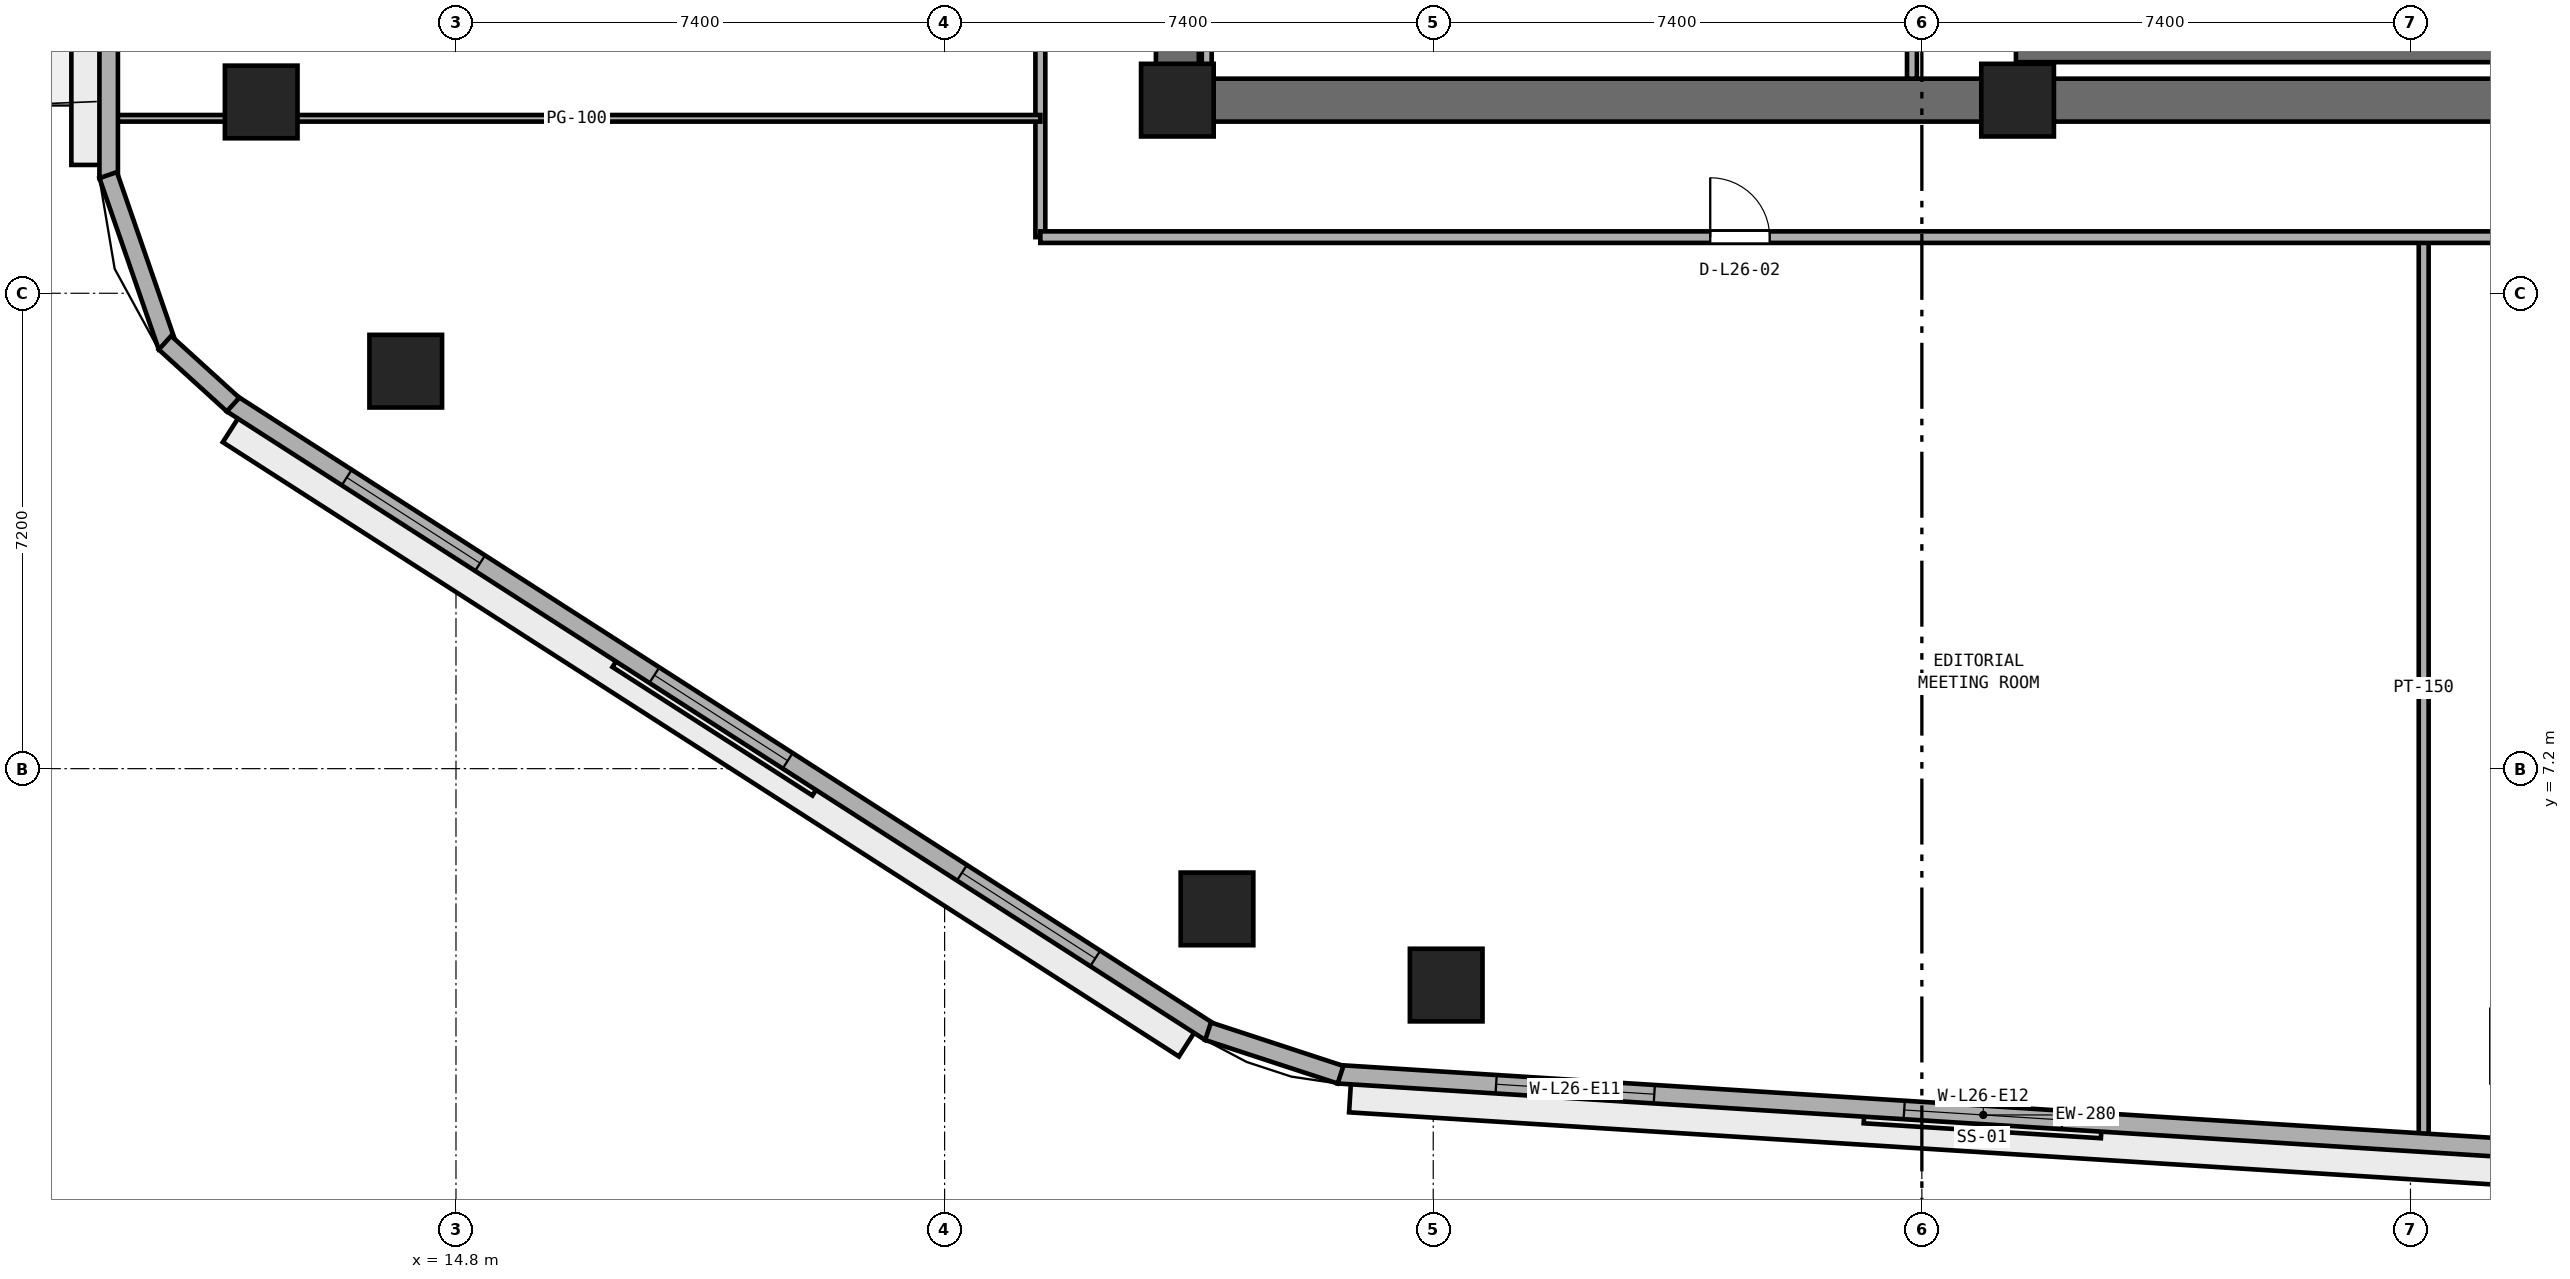
"""IFC4 building model, lengths in metres.
Left out: names, types, materials, properties, quantities, classifications, styles, units other than length and angle.
Written with IfcOpenShell. Run it as: python <this file> out.ifc"""

import sys

from ifc_helpers import new_model, si_unit, direction, frame, frame_2d, origin, origin_2d, place, context, subcontext, project, spatial, rectangle, extrude, element, fill, save


model = new_model("IFC4")
c1 = context("Model", 3, precision=1e-05, world=origin(), true_north=direction((0.0, 1.0)))
c2 = subcontext(c1, "Body", "Model", "MODEL_VIEW")
j1 = project(units=[si_unit("LENGTHUNIT", "METRE"), si_unit("PLANEANGLEUNIT", "RADIAN")], contexts=[c1])
p1 = place(None, origin())
s1 = spatial("IfcSite", under=j1, at=p1, CompositionType="ELEMENT")
p2 = place(p1, origin())
s2 = spatial("IfcBuilding", under=s1, at=p2, CompositionType="ELEMENT")
p3 = place(p2, frame((0.0, 0.0, 104.8)))
s3 = spatial("IfcBuildingStorey", under=s2, at=p3, CompositionType="ELEMENT", Elevation=104.8)
p4 = place(p3, frame((25.4, 17.325, 0.0), z_axis=(0.0, 0.0, 1.0), x_axis=(1.0, 0.0, 0.0)))
e1 = element("IfcWall", 1, at=p4, inside=s3, PredefinedType="SHEAR", context=c2, shape_type="SweptSolid", body=[
    extrude(rectangle(XDim=23.2, YDim=0.65, at=frame_2d((11.6, 0.0))), origin(), (0.0, 0.0, 1.0), 3.525),
])
p5 = place(p3, frame((25.725, 17.65, 0.0), z_axis=(0.0, 0.0, 1.0), x_axis=(0.0, 1.0, 0.0)))
e2 = element("IfcWall", 2, at=p5, inside=s3, PredefinedType="SHEAR", context=c2, shape_type="SweptSolid", body=[
    extrude(rectangle(XDim=15.1, YDim=0.65, at=frame_2d((7.55, 0.0))), origin(), (0.0, 0.0, 1.0), 3.525),
])
p6 = place(p5, frame((6.8, 0.0, 0.0)))
e3 = element("IfcOpeningElement", 3, at=p6, cuts=e2, PredefinedType="OPENING", context=c2, shape_type="SweptSolid", body=[
    extrude(rectangle(XDim=1.5, YDim=2.15, at=frame_2d((0.75, 1.075))), frame((0.0, 0.335, 0.0), z_axis=(0.0, -1.0, 0.0), x_axis=(1.0, 0.0, 0.0)), (0.0, 0.0, 1.0), 0.67),
])
for number, where, z_axis, x_axis in (
    (4, (25.725, 17.325, 0.0), (0.0, 0.0, 1.0), (1.0, 0.0, 0.0)),
    (5, (38.45, 17.325, 0.0), (0.0, 0.0, 1.0), (1.0, 0.0, 0.0)),
):
    element("IfcColumn", number, at=place(p3, frame(where, z_axis=z_axis, x_axis=x_axis)), inside=s3, PredefinedType="PILASTER", context=c2, shape_type="SweptSolid", body=[
        extrude(rectangle(XDim=1.1, YDim=1.1, at=origin_2d()), origin(), (0.0, 0.0, 1.0), 3.8),
    ])
for number, where, z_axis, x_axis in (
    (6, (29.796, 3.922, 0.0), (0.0, 0.0, 1.0), (1.0, 0.0, 0.0)),
    (7, (11.85, 17.298, 0.0), (0.0, 0.0, 1.0), (1.0, 0.0, 0.0)),
    (8, (14.039, 13.22, 0.0), (0.0, 0.0, 1.0), (1.0, 0.0, 0.0)),
    (9, (26.325, 5.076, 0.0), (0.0, 0.0, 1.0), (1.0, 0.0, 0.0)),
):
    element("IfcColumn", number, at=place(p3, frame(where, z_axis=z_axis, x_axis=x_axis)), inside=s3, PredefinedType="COLUMN", context=c2, shape_type="SweptSolid", body=[
        extrude(rectangle(XDim=1.1, YDim=1.1, at=origin_2d()), origin(), (0.0, 0.0, 1.0), 3.8),
    ])
p7 = place(p3, frame((38.425, 18.025, 0.0), z_axis=(0.0, 0.0, 1.0), x_axis=(1.0, 0.0, 0.0)))
e10 = element("IfcWall", 10, at=p7, inside=s3, PredefinedType="SHEAR", context=c2, shape_type="SweptSolid", body=[
    extrude(rectangle(XDim=7.3, YDim=0.25, at=frame_2d((3.65, 0.0))), origin(), (0.0, 0.0, 1.0), 3.525),
])
for number, where, z_axis, x_axis in (
    (11, (26.17, 17.65, 0.0), (0.0, 0.0, 1.0), (0.0, 1.0, 0.0)),
    (12, (36.85, 17.65, 0.0), (0.0, 0.0, 1.0), (0.0, 1.0, 0.0)),
):
    element("IfcWall", number, at=place(p3, frame(where, z_axis=z_axis, x_axis=x_axis)), inside=s3, PredefinedType="PARTITIONING", context=c2, shape_type="SweptSolid", body=[
        extrude(rectangle(XDim=2.1, YDim=0.15, at=frame_2d((1.05, 0.0))), origin(), (0.0, 0.0, 1.0), 3.525),
    ])
p8 = place(p3, frame((44.6, 1.599, 0.0), z_axis=(0.0, 0.0, 1.0), x_axis=(0.0, 1.0, 0.0)))
e13 = element("IfcWall", 13, at=p8, inside=s3, PredefinedType="PARTITIONING", context=c2, shape_type="SweptSolid", body=[
    extrude(rectangle(XDim=13.651, YDim=0.15, at=frame_2d((6.825, 0.0))), origin(), (0.0, 0.0, 1.0), 3.525),
])
p9 = place(p3, frame((23.65, 15.25, 0.0), z_axis=(0.0, 0.0, 1.0), x_axis=(0.0, 1.0, 0.0)))
e14 = element("IfcWall", 14, at=p9, inside=s3, PredefinedType="PARTITIONING", context=c2, shape_type="SweptSolid", body=[
    extrude(rectangle(XDim=19.9, YDim=0.15, at=frame_2d((9.95, 0.0))), origin(), (0.0, 0.0, 1.0), 3.525),
])
p10 = place(p9, frame((9.5, 0.0, 0.0)))
e15 = element("IfcOpeningElement", 15, at=p10, cuts=e14, PredefinedType="OPENING", context=c2, shape_type="SweptSolid", body=[
    extrude(rectangle(XDim=0.9, YDim=2.1, at=frame_2d((0.45, 1.05))), frame((0.0, 0.085, 0.0), z_axis=(0.0, -1.0, 0.0), x_axis=(1.0, 0.0, 0.0)), (0.0, 0.0, 1.0), 0.17),
])
p11 = place(p3, frame((23.65, 15.25, 0.0), z_axis=(0.0, 0.0, 1.0), x_axis=(1.0, 0.0, 0.0)))
e16 = element("IfcWall", 16, at=p11, inside=s3, PredefinedType="PARTITIONING", context=c2, shape_type="SweptSolid", body=[
    extrude(rectangle(XDim=26.7, YDim=0.175, at=frame_2d((13.35, 0.0))), origin(), (0.0, 0.0, 1.0), 3.525),
])
p12 = place(p11, frame((10.145, 0.0, 0.0)))
e17 = element("IfcOpeningElement", 17, at=p12, cuts=e16, PredefinedType="OPENING", context=c2, shape_type="SweptSolid", body=[
    extrude(rectangle(XDim=0.9, YDim=2.1, at=frame_2d((0.45, 1.05))), frame((0.0, 0.097, 0.0), z_axis=(0.0, -1.0, 0.0), x_axis=(1.0, 0.0, 0.0)), (0.0, 0.0, 1.0), 0.195),
])
p13 = place(p11, frame((23.255, 0.0, 0.0)))
e18 = element("IfcOpeningElement", 18, at=p13, cuts=e16, PredefinedType="OPENING", context=c2, shape_type="SweptSolid", body=[
    extrude(rectangle(XDim=0.9, YDim=2.1, at=frame_2d((0.45, 1.05))), frame((0.0, 0.097, 0.0), z_axis=(0.0, -1.0, 0.0), x_axis=(1.0, 0.0, 0.0)), (0.0, 0.0, 1.0), 0.195),
])
p14 = place(p3, frame((9.605, 17.05, 0.0), z_axis=(0.0, 0.0, 1.0), x_axis=(1.0, 0.0, 0.0)))
e19 = element("IfcWall", 19, at=p14, inside=s3, PredefinedType="PARTITIONING", context=c2, shape_type="SweptSolid", body=[
    extrude(rectangle(XDim=14.045, YDim=0.1, at=frame_2d((7.022, 0.0))), origin(), (0.0, 0.0, 1.0), 3.525),
])
p15 = place(p3, frame((28.161, 2.571, 0.0), z_axis=(0.0, 0.0, 1.0), x_axis=(0.998017288298, -0.06294038654, 0.0)))
e20 = element("IfcWall", 20, at=p15, inside=s3, PredefinedType="STANDARD", context=c2, shape_type="SweptSolid", body=[
    extrude(rectangle(XDim=19.577, YDim=0.28, at=frame_2d((9.789, 0.0))), origin(), (0.0, 0.0, 1.0), 3.525),
])
p16 = place(p15, frame((2.396, 0.0, 0.9)))
e21 = element("IfcOpeningElement", 21, at=p16, cuts=e20, PredefinedType="OPENING", context=c2, shape_type="SweptSolid", body=[
    extrude(rectangle(XDim=2.4, YDim=1.75, at=frame_2d((1.2, 0.875))), frame((0.0, 0.15, 0.0), z_axis=(0.0, -1.0, 0.0), x_axis=(1.0, 0.0, 0.0)), (0.0, 0.0, 1.0), 0.3),
])
p17 = place(p15, frame((8.588, 0.0, 0.9)))
e22 = element("IfcOpeningElement", 22, at=p17, cuts=e20, PredefinedType="OPENING", context=c2, shape_type="SweptSolid", body=[
    extrude(rectangle(XDim=2.4, YDim=1.75, at=frame_2d((1.2, 0.875))), frame((0.0, 0.15, 0.0), z_axis=(0.0, -1.0, 0.0), x_axis=(1.0, 0.0, 0.0)), (0.0, 0.0, 1.0), 0.3),
])
p18 = place(p3, frame((9.54, 33.444, 0.0), z_axis=(0.0, 0.0, 1.0), x_axis=(0.0, -1.0, 0.0)))
e23 = element("IfcWall", 23, at=p18, inside=s3, PredefinedType="STANDARD", context=c2, shape_type="SweptSolid", body=[
    extrude(rectangle(XDim=17.301, YDim=0.28, at=frame_2d((8.65, 0.0))), origin(), (0.0, 0.0, 1.0), 3.525),
])
p19 = place(p18, frame((8.1, 0.0, 0.0)))
e24 = element("IfcOpeningElement", 24, at=p19, cuts=e23, PredefinedType="OPENING", context=c2, shape_type="SweptSolid", body=[
    extrude(rectangle(XDim=1.1, YDim=2.2, at=frame_2d((0.55, 1.1))), frame((0.0, 0.15, 0.0), z_axis=(0.0, -1.0, 0.0), x_axis=(1.0, 0.0, 0.0)), (0.0, 0.0, 1.0), 0.3),
])
p20 = place(p18, frame((2.017, 0.0, 0.9)))
e25 = element("IfcOpeningElement", 25, at=p20, cuts=e23, PredefinedType="OPENING", context=c2, shape_type="SweptSolid", body=[
    extrude(rectangle(XDim=2.4, YDim=1.75, at=frame_2d((1.2, 0.875))), frame((0.0, 0.15, 0.0), z_axis=(0.0, -1.0, 0.0), x_axis=(1.0, 0.0, 0.0)), (0.0, 0.0, 1.0), 0.3),
])
p21 = place(p18, frame((12.884, 0.0, 0.9)))
e26 = element("IfcOpeningElement", 26, at=p21, cuts=e23, PredefinedType="OPENING", context=c2, shape_type="SweptSolid", body=[
    extrude(rectangle(XDim=2.4, YDim=1.75, at=frame_2d((1.2, 0.875))), frame((0.0, 0.15, 0.0), z_axis=(0.0, -1.0, 0.0), x_axis=(1.0, 0.0, 0.0)), (0.0, 0.0, 1.0), 0.3),
])
p22 = place(p3, frame((11.405, 12.728, 0.0), z_axis=(0.0, 0.0, 1.0), x_axis=(0.841304564637, -0.540561402175, 0.0)))
e27 = element("IfcWall", 27, at=p22, inside=s3, PredefinedType="STANDARD", context=c2, shape_type="SweptSolid", body=[
    extrude(rectangle(XDim=17.612, YDim=0.28, at=frame_2d((8.806, 0.0))), origin(), (0.0, 0.0, 1.0), 3.525),
])
p23 = place(p22, frame((2.069, 0.0, 0.9)))
e28 = element("IfcOpeningElement", 28, at=p23, cuts=e27, PredefinedType="OPENING", context=c2, shape_type="SweptSolid", body=[
    extrude(rectangle(XDim=2.4, YDim=1.75, at=frame_2d((1.2, 0.875))), frame((0.0, 0.15, 0.0), z_axis=(0.0, -1.0, 0.0), x_axis=(1.0, 0.0, 0.0)), (0.0, 0.0, 1.0), 0.3),
])
p24 = place(p22, frame((7.606, 0.0, 0.9)))
e29 = element("IfcOpeningElement", 29, at=p24, cuts=e27, PredefinedType="OPENING", context=c2, shape_type="SweptSolid", body=[
    extrude(rectangle(XDim=2.4, YDim=1.75, at=frame_2d((1.2, 0.875))), frame((0.0, 0.15, 0.0), z_axis=(0.0, -1.0, 0.0), x_axis=(1.0, 0.0, 0.0)), (0.0, 0.0, 1.0), 0.3),
])
p25 = place(p22, frame((13.143, 0.0, 0.9)))
e30 = element("IfcOpeningElement", 30, at=p25, cuts=e27, PredefinedType="OPENING", context=c2, shape_type="SweptSolid", body=[
    extrude(rectangle(XDim=2.4, YDim=1.75, at=frame_2d((1.2, 0.875))), frame((0.0, 0.15, 0.0), z_axis=(0.0, -1.0, 0.0), x_axis=(1.0, 0.0, 0.0)), (0.0, 0.0, 1.0), 0.3),
])
p26 = place(p3, frame((9.532, 16.189, 0.0), z_axis=(0.0, 0.0, 1.0), x_axis=(0.32708309668, -0.944995580871, 0.0)))
e31 = element("IfcWall", 31, at=p26, inside=s3, PredefinedType="STANDARD", context=c2, shape_type="SweptSolid", body=[
    extrude(rectangle(XDim=2.748, YDim=0.28, at=frame_2d((1.374, 0.0))), origin(), (0.0, 0.0, 1.0), 3.525),
])
p27 = place(p3, frame((10.393, 13.651, 0.0), z_axis=(0.0, 0.0, 1.0), x_axis=(0.74003521851, -0.672568119498, 0.0)))
e32 = element("IfcWall", 32, at=p27, inside=s3, PredefinedType="STANDARD", context=c2, shape_type="SweptSolid", body=[
    extrude(rectangle(XDim=1.393, YDim=0.28, at=frame_2d((0.697, 0.0))), origin(), (0.0, 0.0, 1.0), 3.525),
])
p28 = place(p3, frame((26.19, 3.223, 0.0), z_axis=(0.0, 0.0, 1.0), x_axis=(0.95016442175, -0.311749212734, 0.0)))
e33 = element("IfcWall", 33, at=p28, inside=s3, PredefinedType="STANDARD", context=c2, shape_type="SweptSolid", body=[
    extrude(rectangle(XDim=2.111, YDim=0.28, at=frame_2d((1.056, 0.0))), origin(), (0.0, 0.0, 1.0), 3.525),
])
p29 = place(p12, origin())
e34 = element("IfcDoor", 34, at=p29, inside=s3, OperationType="SINGLE_SWING_LEFT", PredefinedType="DOOR", context=c2, shape_type="SweptSolid", body=[
    extrude(rectangle(XDim=0.9, YDim=2.1, at=frame_2d((0.45, 1.05))), frame((0.0, 0.025, 0.0), z_axis=(0.0, -1.0, 0.0), x_axis=(1.0, 0.0, 0.0)), (0.0, 0.0, 1.0), 0.05),
])
fill(e17, e34)
p30 = place(p16, origin())
e35 = element("IfcWindow", 35, at=p30, inside=s3, PartitioningType="SINGLE_PANEL", PredefinedType="WINDOW", context=c2, shape_type="SweptSolid", body=[
    extrude(rectangle(XDim=2.4, YDim=1.75, at=frame_2d((1.2, 0.875))), frame((0.0, 0.03, 0.0), z_axis=(0.0, -1.0, 0.0), x_axis=(1.0, 0.0, 0.0)), (0.0, 0.0, 1.0), 0.06),
])
fill(e21, e35)
p31 = place(p17, origin())
e36 = element("IfcWindow", 36, at=p31, inside=s3, PartitioningType="SINGLE_PANEL", PredefinedType="WINDOW", context=c2, shape_type="SweptSolid", body=[
    extrude(rectangle(XDim=2.4, YDim=1.75, at=frame_2d((1.2, 0.875))), frame((0.0, 0.03, 0.0), z_axis=(0.0, -1.0, 0.0), x_axis=(1.0, 0.0, 0.0)), (0.0, 0.0, 1.0), 0.06),
])
fill(e22, e36)
p32 = place(p23, origin())
e37 = element("IfcWindow", 37, at=p32, inside=s3, PartitioningType="SINGLE_PANEL", PredefinedType="WINDOW", context=c2, shape_type="SweptSolid", body=[
    extrude(rectangle(XDim=2.4, YDim=1.75, at=frame_2d((1.2, 0.875))), frame((0.0, 0.03, 0.0), z_axis=(0.0, -1.0, 0.0), x_axis=(1.0, 0.0, 0.0)), (0.0, 0.0, 1.0), 0.06),
])
fill(e28, e37)
p33 = place(p24, origin())
e38 = element("IfcWindow", 38, at=p33, inside=s3, PartitioningType="SINGLE_PANEL", PredefinedType="WINDOW", context=c2, shape_type="SweptSolid", body=[
    extrude(rectangle(XDim=2.4, YDim=1.75, at=frame_2d((1.2, 0.875))), frame((0.0, 0.03, 0.0), z_axis=(0.0, -1.0, 0.0), x_axis=(1.0, 0.0, 0.0)), (0.0, 0.0, 1.0), 0.06),
])
fill(e29, e38)
p34 = place(p25, origin())
e39 = element("IfcWindow", 39, at=p34, inside=s3, PartitioningType="SINGLE_PANEL", PredefinedType="WINDOW", context=c2, shape_type="SweptSolid", body=[
    extrude(rectangle(XDim=2.4, YDim=1.75, at=frame_2d((1.2, 0.875))), frame((0.0, 0.03, 0.0), z_axis=(0.0, -1.0, 0.0), x_axis=(1.0, 0.0, 0.0)), (0.0, 0.0, 1.0), 0.06),
])
fill(e30, e39)
save(model, sys.argv[1])
